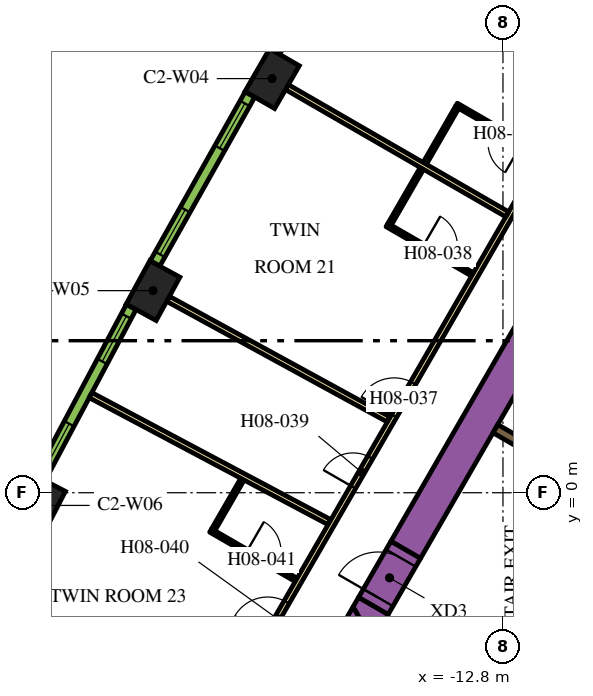
"""IFC4 building model, lengths in metres.
Left out: names, types, materials, properties, quantities, classifications, styles, units other than length and angle.
Written with IfcOpenShell. Run it as: python <this file> out.ifc"""

import sys

from ifc_helpers import new_model, si_unit, direction, frame, frame_2d, origin, origin_2d, place, context, subcontext, project, spatial, polyline, rectangle, outline, extrude, element, fill, save


model = new_model("IFC4")
c1 = context("Model", 3, precision=1e-05, world=origin(), true_north=direction((0.0, 1.0)))
c2 = subcontext(c1, "Body", "Model", "MODEL_VIEW")
j1 = project(units=[si_unit("LENGTHUNIT", "METRE"), si_unit("PLANEANGLEUNIT", "RADIAN")], contexts=[c1])
p1 = place(None, origin())
s1 = spatial("IfcSite", under=j1, at=p1, CompositionType="ELEMENT")
p2 = place(p1, origin())
s2 = spatial("IfcBuilding", under=s1, at=p2, CompositionType="ELEMENT")
p3 = place(p2, frame((0.0, 0.0, 114.9)))
s3 = spatial("IfcBuildingStorey", under=s2, at=p3, CompositionType="ELEMENT", Elevation=114.9)
for number, where, z_axis, x_axis in (
    (1, (-18.874, 10.897, 0.0), (0.0, 0.0, 1.0), (-0.5, -0.866, 0.0)),
    (2, (-22.009, 5.317, 0.0), (0.0, 0.0, 1.0), (-0.48, -0.877, 0.0)),
    (3, (-25.012, -0.334, 0.0), (0.0, 0.0, 1.0), (-0.459, -0.888, 0.0)),
):
    element("IfcColumn", number, at=place(p3, frame(where, z_axis=z_axis, x_axis=x_axis)), inside=s3, PredefinedType="COLUMN", context=c2, shape_type="SweptSolid", body=[
        extrude(rectangle(XDim=1.3, YDim=0.9, at=origin_2d()), origin(), (0.0, 0.0, 1.0), 3.9),
    ])
p4 = place(p3, frame((-15.36, -1.503, 0.0), z_axis=(0.0, 0.0, 1.0), x_axis=(0.50000389221, 0.866023156604, 0.0)))
e4 = element("IfcWall", 4, at=p4, inside=s3, PredefinedType="SOLIDWALL", context=c2, shape_type="SweptSolid", body=[
    extrude(rectangle(XDim=21.0, YDim=0.9, at=frame_2d((10.5, 0.0))), origin(), (0.0, 0.0, 1.0), 3.9),
])
p5 = place(p3, origin())
e5 = element("IfcWall", 5, at=p5, inside=s3, PredefinedType="SOLIDWALL", context=c2, shape_type="SweptSolid", body=[
    extrude(outline(polyline([(-16.489, -3.44), (-17.251, -3.88), (-16.743, -3.0), (-16.489, -3.44)])), origin(), (0.0, 0.0, 1.0), 3.9),
])
e6 = element("IfcWall", 6, at=p5, inside=s3, PredefinedType="SOLIDWALL", context=c2, shape_type="SweptSolid", body=[
    extrude(outline(polyline([(-15.82, -3.201), (-16.223, -3.9), (-16.743, -3.0), (-16.599, -2.751), (-15.82, -3.201)])), origin(), (0.0, 0.0, 1.0), 3.9),
])
p6 = place(p3, frame((-14.44, -6.49, 0.0), z_axis=(0.0, 0.0, 1.0), x_axis=(0.866022966069, 0.500004222222, 0.0)))
e7 = element("IfcWall", 7, at=p6, inside=s3, PredefinedType="SOLIDWALL", context=c2, shape_type="SweptSolid", body=[
    extrude(rectangle(XDim=6.8, YDim=0.25, at=frame_2d((3.4, 0.0))), origin(), (0.0, 0.0, 1.0), 3.9),
])
p7 = place(p3, frame((-8.106, -1.14, 0.0), z_axis=(0.0, 0.0, 1.0), x_axis=(-0.866000643155, 0.500042884217, 0.0)))
e8 = element("IfcWall", 8, at=p7, inside=s3, PredefinedType="SOLIDWALL", context=c2, shape_type="SweptSolid", body=[
    extrude(rectangle(XDim=5.65, YDim=0.25, at=frame_2d((2.825, 0.0))), origin(), (0.0, 0.0, 1.0), 3.9),
])
p8 = place(p3, frame((-16.209, -2.976, 0.0), z_axis=(0.0, 0.0, 1.0), x_axis=(0.499954529098, 0.86605165483, 0.0)))
e9 = element("IfcWall", 9, at=p8, inside=s3, PredefinedType="SOLIDWALL", context=c2, shape_type="SweptSolid", body=[
    extrude(rectangle(XDim=1.7, YDim=0.9, at=frame_2d((0.85, 0.0))), origin(), (0.0, 0.0, 1.0), 3.9),
])
p9 = place(p8, frame((0.25, 0.0, 0.0)))
e10 = element("IfcOpeningElement", 10, at=p9, cuts=e9, PredefinedType="OPENING", context=c2, shape_type="SweptSolid", body=[
    extrude(rectangle(XDim=1.2, YDim=2.1, at=frame_2d((0.6, 1.05))), frame((0.0, 0.46, 0.0), z_axis=(0.0, -1.0, 0.0), x_axis=(1.0, 0.0, 0.0)), (0.0, 0.0, 1.0), 0.92),
])
p10 = place(p3, frame((-19.081, -3.9, 0.0), z_axis=(0.0, 0.0, 1.0), x_axis=(0.499998313975, 0.866026377209, 0.0)))
e11 = element("IfcWall", 11, at=p10, inside=s3, PredefinedType="PARTITIONING", context=c2, shape_type="SweptSolid", body=[
    extrude(rectangle(XDim=25.766, YDim=0.15, at=frame_2d((12.883, 0.0))), origin(), (0.0, 0.0, 1.0), 2.75),
])
p11 = place(p10, frame((19.306, 0.0, 0.0)))
e12 = element("IfcOpeningElement", 12, at=p11, cuts=e11, PredefinedType="OPENING", context=c2, shape_type="SweptSolid", body=[
    extrude(rectangle(XDim=1.0, YDim=2.1, at=frame_2d((0.5, 1.05))), frame((0.0, 0.085, 0.0), z_axis=(0.0, -1.0, 0.0), x_axis=(1.0, 0.0, 0.0)), (0.0, 0.0, 1.0), 0.17),
])
p12 = place(p10, frame((18.0, 0.0, 0.0)))
e13 = element("IfcOpeningElement", 13, at=p12, cuts=e11, PredefinedType="OPENING", context=c2, shape_type="SweptSolid", body=[
    extrude(rectangle(XDim=1.0, YDim=2.1, at=frame_2d((0.5, 1.05))), frame((0.0, 0.085, 0.0), z_axis=(0.0, -1.0, 0.0), x_axis=(1.0, 0.0, 0.0)), (0.0, 0.0, 1.0), 0.17),
])
p13 = place(p10, frame((6.838, 0.0, 0.0)))
e14 = element("IfcOpeningElement", 14, at=p13, cuts=e11, PredefinedType="OPENING", context=c2, shape_type="SweptSolid", body=[
    extrude(rectangle(XDim=1.0, YDim=2.1, at=frame_2d((0.5, 1.05))), frame((0.0, 0.085, 0.0), z_axis=(0.0, -1.0, 0.0), x_axis=(1.0, 0.0, 0.0)), (0.0, 0.0, 1.0), 0.17),
])
p14 = place(p10, frame((4.674, 0.0, 0.0)))
e15 = element("IfcOpeningElement", 15, at=p14, cuts=e11, PredefinedType="OPENING", context=c2, shape_type="SweptSolid", body=[
    extrude(rectangle(XDim=0.9, YDim=2.1, at=frame_2d((0.45, 1.05))), frame((0.0, 0.085, 0.0), z_axis=(0.0, -1.0, 0.0), x_axis=(1.0, 0.0, 0.0)), (0.0, 0.0, 1.0), 0.17),
])
p15 = place(p10, frame((0.18, 0.0, 0.0)))
e16 = element("IfcOpeningElement", 16, at=p15, cuts=e11, PredefinedType="OPENING", context=c2, shape_type="SweptSolid", body=[
    extrude(rectangle(XDim=1.0, YDim=2.1, at=frame_2d((0.5, 1.05))), frame((0.0, 0.085, 0.0), z_axis=(0.0, -1.0, 0.0), x_axis=(1.0, 0.0, 0.0)), (0.0, 0.0, 1.0), 0.17),
])
p16 = place(p3, frame((-23.652, 2.567, 0.0), z_axis=(0.0, 0.0, 1.0), x_axis=(0.883019237957, -0.469336793144, 0.0)))
e17 = element("IfcWall", 17, at=p16, inside=s3, PredefinedType="PARTITIONING", context=c2, shape_type="SweptSolid", body=[
    extrude(rectangle(XDim=7.111, YDim=0.15, at=frame_2d((3.555, 0.0))), origin(), (0.0, 0.0, 1.0), 2.75),
])
p17 = place(p3, frame((-26.591, -3.122, 0.0), z_axis=(0.0, 0.0, 1.0), x_axis=(0.893766213273, -0.448533115847, 0.0)))
e18 = element("IfcWall", 18, at=p17, inside=s3, PredefinedType="PARTITIONING", context=c2, shape_type="SweptSolid", body=[
    extrude(rectangle(XDim=10.875, YDim=0.15, at=frame_2d((5.438, 0.0))), origin(), (0.0, 0.0, 1.0), 2.75),
])
p18 = place(p3, frame((-21.614, 5.102, 0.0), z_axis=(0.0, 0.0, 1.0), x_axis=(0.877484555087, -0.479604895287, 0.0)))
e19 = element("IfcWall", 19, at=p18, inside=s3, PredefinedType="PARTITIONING", context=c2, shape_type="SweptSolid", body=[
    extrude(rectangle(XDim=6.611, YDim=0.15, at=frame_2d((3.306, 0.0))), origin(), (0.0, 0.0, 1.0), 2.75),
])
p19 = place(p3, frame((-18.484, 10.672, 0.0), z_axis=(0.0, 0.0, 1.0), x_axis=(0.866019162053, -0.50001081084, 0.0)))
e20 = element("IfcWall", 20, at=p19, inside=s3, PredefinedType="PARTITIONING", context=c2, shape_type="SweptSolid", body=[
    extrude(rectangle(XDim=6.694, YDim=0.15, at=frame_2d((3.347, 0.0))), origin(), (0.0, 0.0, 1.0), 2.75),
])
p20 = place(p3, frame((-11.774, 8.906, 0.0), z_axis=(0.0, 0.0, 1.0), x_axis=(-0.865997922154, 0.500047596559, 0.0)))
e21 = element("IfcWall", 21, at=p20, inside=s3, PredefinedType="PARTITIONING", context=c2, shape_type="SweptSolid", body=[
    extrude(rectangle(XDim=2.6, YDim=0.1, at=frame_2d((1.3, 0.0))), origin(), (0.0, 0.0, 1.0), 2.75),
])
p21 = place(p20, frame((0.6, 0.0, 0.0)))
e22 = element("IfcOpeningElement", 22, at=p21, cuts=e21, PredefinedType="OPENING", context=c2, shape_type="SweptSolid", body=[
    extrude(rectangle(XDim=0.9, YDim=2.1, at=frame_2d((0.45, 1.05))), frame((0.0, 0.06, 0.0), z_axis=(0.0, -1.0, 0.0), x_axis=(1.0, 0.0, 0.0)), (0.0, 0.0, 1.0), 0.12),
])
p22 = place(p3, frame((-14.008, 10.138, 0.0), z_axis=(0.0, 0.0, 1.0), x_axis=(-0.499892348375, -0.866087547558, 0.0)))
e23 = element("IfcWall", 23, at=p22, inside=s3, PredefinedType="PARTITIONING", context=c2, shape_type="SweptSolid", body=[
    extrude(rectangle(XDim=1.7, YDim=0.1, at=frame_2d((0.85, 0.0))), origin(), (0.0, 0.0, 1.0), 2.75),
])
p23 = place(p3, frame((-15.852, 7.044, 0.0), z_axis=(0.0, 0.0, 1.0), x_axis=(0.866021400173, -0.500006934395, 0.0)))
e24 = element("IfcWall", 24, at=p23, inside=s3, PredefinedType="PARTITIONING", context=c2, shape_type="SweptSolid", body=[
    extrude(rectangle(XDim=2.6, YDim=0.1, at=frame_2d((1.3, 0.0))), origin(), (0.0, 0.0, 1.0), 2.75),
])
p24 = place(p23, frame((1.1, 0.0, 0.0)))
e25 = element("IfcOpeningElement", 25, at=p24, cuts=e24, PredefinedType="OPENING", context=c2, shape_type="SweptSolid", body=[
    extrude(rectangle(XDim=0.9, YDim=2.1, at=frame_2d((0.45, 1.05))), frame((0.0, 0.06, 0.0), z_axis=(0.0, -1.0, 0.0), x_axis=(1.0, 0.0, 0.0)), (0.0, 0.0, 1.0), 0.12),
])
p25 = place(p3, frame((-15.783, 7.062, 0.0), z_axis=(0.0, 0.0, 1.0), x_axis=(0.499954529098, 0.86605165483, 0.0)))
e26 = element("IfcWall", 26, at=p25, inside=s3, PredefinedType="PARTITIONING", context=c2, shape_type="SweptSolid", body=[
    extrude(rectangle(XDim=1.7, YDim=0.1, at=frame_2d((0.85, 0.0))), origin(), (0.0, 0.0, 1.0), 2.75),
])
p26 = place(p3, frame((-20.492, -0.994, 0.0), z_axis=(0.0, 0.0, 1.0), x_axis=(0.865997922154, -0.500047596559, 0.0)))
e27 = element("IfcWall", 27, at=p26, inside=s3, PredefinedType="PARTITIONING", context=c2, shape_type="SweptSolid", body=[
    extrude(rectangle(XDim=2.6, YDim=0.1, at=frame_2d((1.3, 0.0))), origin(), (0.0, 0.0, 1.0), 2.75),
])
p27 = place(p26, frame((1.1, 0.0, 0.0)))
e28 = element("IfcOpeningElement", 28, at=p27, cuts=e27, PredefinedType="OPENING", context=c2, shape_type="SweptSolid", body=[
    extrude(rectangle(XDim=0.9, YDim=2.1, at=frame_2d((0.45, 1.05))), frame((0.0, 0.06, 0.0), z_axis=(0.0, -1.0, 0.0), x_axis=(1.0, 0.0, 0.0)), (0.0, 0.0, 1.0), 0.12),
])
p28 = place(p3, frame((-20.424, -0.976, 0.0), z_axis=(0.0, 0.0, 1.0), x_axis=(0.500086174919, 0.865975644955, 0.0)))
e29 = element("IfcWall", 29, at=p28, inside=s3, PredefinedType="PARTITIONING", context=c2, shape_type="SweptSolid", body=[
    extrude(rectangle(XDim=1.53, YDim=0.1, at=frame_2d((0.765, 0.0))), origin(), (0.0, 0.0, 1.0), 2.75),
])
p29 = place(p3, frame((-16.203, 15.998, 0.0), z_axis=(0.0, 0.0, 1.0), x_axis=(-0.510054281659, -0.860142214847, 0.0)))
e30 = element("IfcWall", 30, at=p29, inside=s3, PredefinedType="SOLIDWALL", context=c2, shape_type="SweptSolid", body=[
    extrude(rectangle(XDim=5.101, YDim=0.29, at=frame_2d((2.55, 0.0))), origin(), (0.0, 0.0, 1.0), 3.65),
])
p30 = place(p29, frame((0.273, 0.0, 0.9)))
e31 = element("IfcOpeningElement", 31, at=p30, cuts=e30, PredefinedType="OPENING", context=c2, shape_type="SweptSolid", body=[
    extrude(rectangle(XDim=1.35, YDim=2.15, at=frame_2d((0.675, 1.075))), frame((0.0, 0.155, 0.0), z_axis=(0.0, -1.0, 0.0), x_axis=(1.0, 0.0, 0.0)), (0.0, 0.0, 1.0), 0.31),
])
p31 = place(p29, frame((3.478, 0.0, 0.9)))
e32 = element("IfcOpeningElement", 32, at=p31, cuts=e30, PredefinedType="OPENING", context=c2, shape_type="SweptSolid", body=[
    extrude(rectangle(XDim=1.35, YDim=2.15, at=frame_2d((0.675, 1.075))), frame((0.0, 0.155, 0.0), z_axis=(0.0, -1.0, 0.0), x_axis=(1.0, 0.0, 0.0)), (0.0, 0.0, 1.0), 0.31),
])
p32 = place(p3, frame((-19.458, 10.48, 0.0), z_axis=(0.0, 0.0, 1.0), x_axis=(-0.48983164787, -0.87181704316, 0.0)))
e33 = element("IfcWall", 33, at=p32, inside=s3, PredefinedType="SOLIDWALL", context=c2, shape_type="SweptSolid", body=[
    extrude(rectangle(XDim=5.1, YDim=0.29, at=frame_2d((2.55, 0.0))), origin(), (0.0, 0.0, 1.0), 3.65),
])
p33 = place(p32, frame((0.272, 0.0, 0.9)))
e34 = element("IfcOpeningElement", 34, at=p33, cuts=e33, PredefinedType="OPENING", context=c2, shape_type="SweptSolid", body=[
    extrude(rectangle(XDim=1.35, YDim=2.15, at=frame_2d((0.675, 1.075))), frame((0.0, 0.155, 0.0), z_axis=(0.0, -1.0, 0.0), x_axis=(1.0, 0.0, 0.0)), (0.0, 0.0, 1.0), 0.31),
])
p34 = place(p32, frame((3.478, 0.0, 0.9)))
e35 = element("IfcOpeningElement", 35, at=p34, cuts=e33, PredefinedType="OPENING", context=c2, shape_type="SweptSolid", body=[
    extrude(rectangle(XDim=1.35, YDim=2.15, at=frame_2d((0.675, 1.075))), frame((0.0, 0.155, 0.0), z_axis=(0.0, -1.0, 0.0), x_axis=(1.0, 0.0, 0.0)), (0.0, 0.0, 1.0), 0.31),
])
p35 = place(p3, frame((-22.583, 4.887, 0.0), z_axis=(0.0, 0.0, 1.0), x_axis=(-0.469323203119, -0.883026461106, 0.0)))
e36 = element("IfcWall", 36, at=p35, inside=s3, PredefinedType="SOLIDWALL", context=c2, shape_type="SweptSolid", body=[
    extrude(rectangle(XDim=5.101, YDim=0.29, at=frame_2d((2.55, 0.0))), origin(), (0.0, 0.0, 1.0), 3.65),
])
p36 = place(p35, frame((0.273, 0.0, 0.9)))
e37 = element("IfcOpeningElement", 37, at=p36, cuts=e36, PredefinedType="OPENING", context=c2, shape_type="SweptSolid", body=[
    extrude(rectangle(XDim=1.35, YDim=2.15, at=frame_2d((0.675, 1.075))), frame((0.0, 0.155, 0.0), z_axis=(0.0, -1.0, 0.0), x_axis=(1.0, 0.0, 0.0)), (0.0, 0.0, 1.0), 0.31),
])
p37 = place(p35, frame((3.478, 0.0, 0.9)))
e38 = element("IfcOpeningElement", 38, at=p37, cuts=e36, PredefinedType="OPENING", context=c2, shape_type="SweptSolid", body=[
    extrude(rectangle(XDim=1.35, YDim=2.15, at=frame_2d((0.675, 1.075))), frame((0.0, 0.155, 0.0), z_axis=(0.0, -1.0, 0.0), x_axis=(1.0, 0.0, 0.0)), (0.0, 0.0, 1.0), 0.31),
])
p38 = place(p9, origin())
e39 = element("IfcDoor", 39, at=p38, inside=s3, OperationType="SINGLE_SWING_LEFT", PredefinedType="DOOR", context=c2, shape_type="SweptSolid", body=[
    extrude(rectangle(XDim=1.2, YDim=2.1, at=frame_2d((0.6, 1.05))), frame((0.0, 0.025, 0.0), z_axis=(0.0, -1.0, 0.0), x_axis=(1.0, 0.0, 0.0)), (0.0, 0.0, 1.0), 0.05),
])
fill(e10, e39)
p39 = place(p21, origin())
e40 = element("IfcDoor", 40, at=p39, inside=s3, OperationType="SINGLE_SWING_LEFT", PredefinedType="DOOR", context=c2, shape_type="SweptSolid", body=[
    extrude(rectangle(XDim=0.9, YDim=2.1, at=frame_2d((0.45, 1.05))), frame((0.0, 0.025, 0.0), z_axis=(0.0, -1.0, 0.0), x_axis=(1.0, 0.0, 0.0)), (0.0, 0.0, 1.0), 0.05),
])
fill(e22, e40)
p40 = place(p13, origin())
e41 = element("IfcDoor", 41, at=p40, inside=s3, OperationType="SINGLE_SWING_LEFT", PredefinedType="DOOR", context=c2, shape_type="SweptSolid", body=[
    extrude(rectangle(XDim=1.0, YDim=2.1, at=frame_2d((0.5, 1.05))), frame((0.0, 0.025, 0.0), z_axis=(0.0, -1.0, 0.0), x_axis=(1.0, 0.0, 0.0)), (0.0, 0.0, 1.0), 0.05),
])
fill(e14, e41)
p41 = place(p24, origin())
e42 = element("IfcDoor", 42, at=p41, inside=s3, OperationType="SINGLE_SWING_RIGHT", PredefinedType="DOOR", context=c2, shape_type="SweptSolid", body=[
    extrude(rectangle(XDim=0.9, YDim=2.1, at=frame_2d((0.45, 1.05))), frame((0.0, 0.025, 0.0), z_axis=(0.0, -1.0, 0.0), x_axis=(1.0, 0.0, 0.0)), (0.0, 0.0, 1.0), 0.05),
])
fill(e25, e42)
p42 = place(p14, origin())
e43 = element("IfcDoor", 43, at=p42, inside=s3, OperationType="SINGLE_SWING_RIGHT", PredefinedType="DOOR", context=c2, shape_type="SweptSolid", body=[
    extrude(rectangle(XDim=0.9, YDim=2.1, at=frame_2d((0.45, 1.05))), frame((0.0, 0.025, 0.0), z_axis=(0.0, -1.0, 0.0), x_axis=(1.0, 0.0, 0.0)), (0.0, 0.0, 1.0), 0.05),
])
fill(e15, e43)
p43 = place(p15, origin())
e44 = element("IfcDoor", 44, at=p43, inside=s3, OperationType="SINGLE_SWING_LEFT", PredefinedType="DOOR", context=c2, shape_type="SweptSolid", body=[
    extrude(rectangle(XDim=1.0, YDim=2.1, at=frame_2d((0.5, 1.05))), frame((0.0, 0.025, 0.0), z_axis=(0.0, -1.0, 0.0), x_axis=(1.0, 0.0, 0.0)), (0.0, 0.0, 1.0), 0.05),
])
fill(e16, e44)
p44 = place(p27, origin())
e45 = element("IfcDoor", 45, at=p44, inside=s3, OperationType="SINGLE_SWING_LEFT", PredefinedType="DOOR", context=c2, shape_type="SweptSolid", body=[
    extrude(rectangle(XDim=0.9, YDim=2.1, at=frame_2d((0.45, 1.05))), frame((0.0, 0.025, 0.0), z_axis=(0.0, -1.0, 0.0), x_axis=(1.0, 0.0, 0.0)), (0.0, 0.0, 1.0), 0.05),
])
fill(e28, e45)
p45 = place(p33, origin())
e46 = element("IfcWindow", 46, at=p45, inside=s3, PartitioningType="DOUBLE_PANEL_VERTICAL", PredefinedType="WINDOW", context=c2, shape_type="SweptSolid", body=[
    extrude(rectangle(XDim=1.35, YDim=2.15, at=frame_2d((0.675, 1.075))), frame((0.0, 0.015, 0.0), z_axis=(0.0, -1.0, 0.0), x_axis=(1.0, 0.0, 0.0)), (0.0, 0.0, 1.0), 0.06),
])
fill(e34, e46)
p46 = place(p34, origin())
e47 = element("IfcWindow", 47, at=p46, inside=s3, PartitioningType="DOUBLE_PANEL_VERTICAL", PredefinedType="WINDOW", context=c2, shape_type="SweptSolid", body=[
    extrude(rectangle(XDim=1.35, YDim=2.15, at=frame_2d((0.675, 1.075))), frame((0.0, 0.015, 0.0), z_axis=(0.0, -1.0, 0.0), x_axis=(1.0, 0.0, 0.0)), (0.0, 0.0, 1.0), 0.06),
])
fill(e35, e47)
p47 = place(p36, origin())
e48 = element("IfcWindow", 48, at=p47, inside=s3, PartitioningType="DOUBLE_PANEL_VERTICAL", PredefinedType="WINDOW", context=c2, shape_type="SweptSolid", body=[
    extrude(rectangle(XDim=1.35, YDim=2.15, at=frame_2d((0.675, 1.075))), frame((0.0, 0.015, 0.0), z_axis=(0.0, -1.0, 0.0), x_axis=(1.0, 0.0, 0.0)), (0.0, 0.0, 1.0), 0.06),
])
fill(e37, e48)
p48 = place(p37, origin())
e49 = element("IfcWindow", 49, at=p48, inside=s3, PartitioningType="DOUBLE_PANEL_VERTICAL", PredefinedType="WINDOW", context=c2, shape_type="SweptSolid", body=[
    extrude(rectangle(XDim=1.35, YDim=2.15, at=frame_2d((0.675, 1.075))), frame((0.0, 0.015, 0.0), z_axis=(0.0, -1.0, 0.0), x_axis=(1.0, 0.0, 0.0)), (0.0, 0.0, 1.0), 0.06),
])
fill(e38, e49)
save(model, sys.argv[1])
